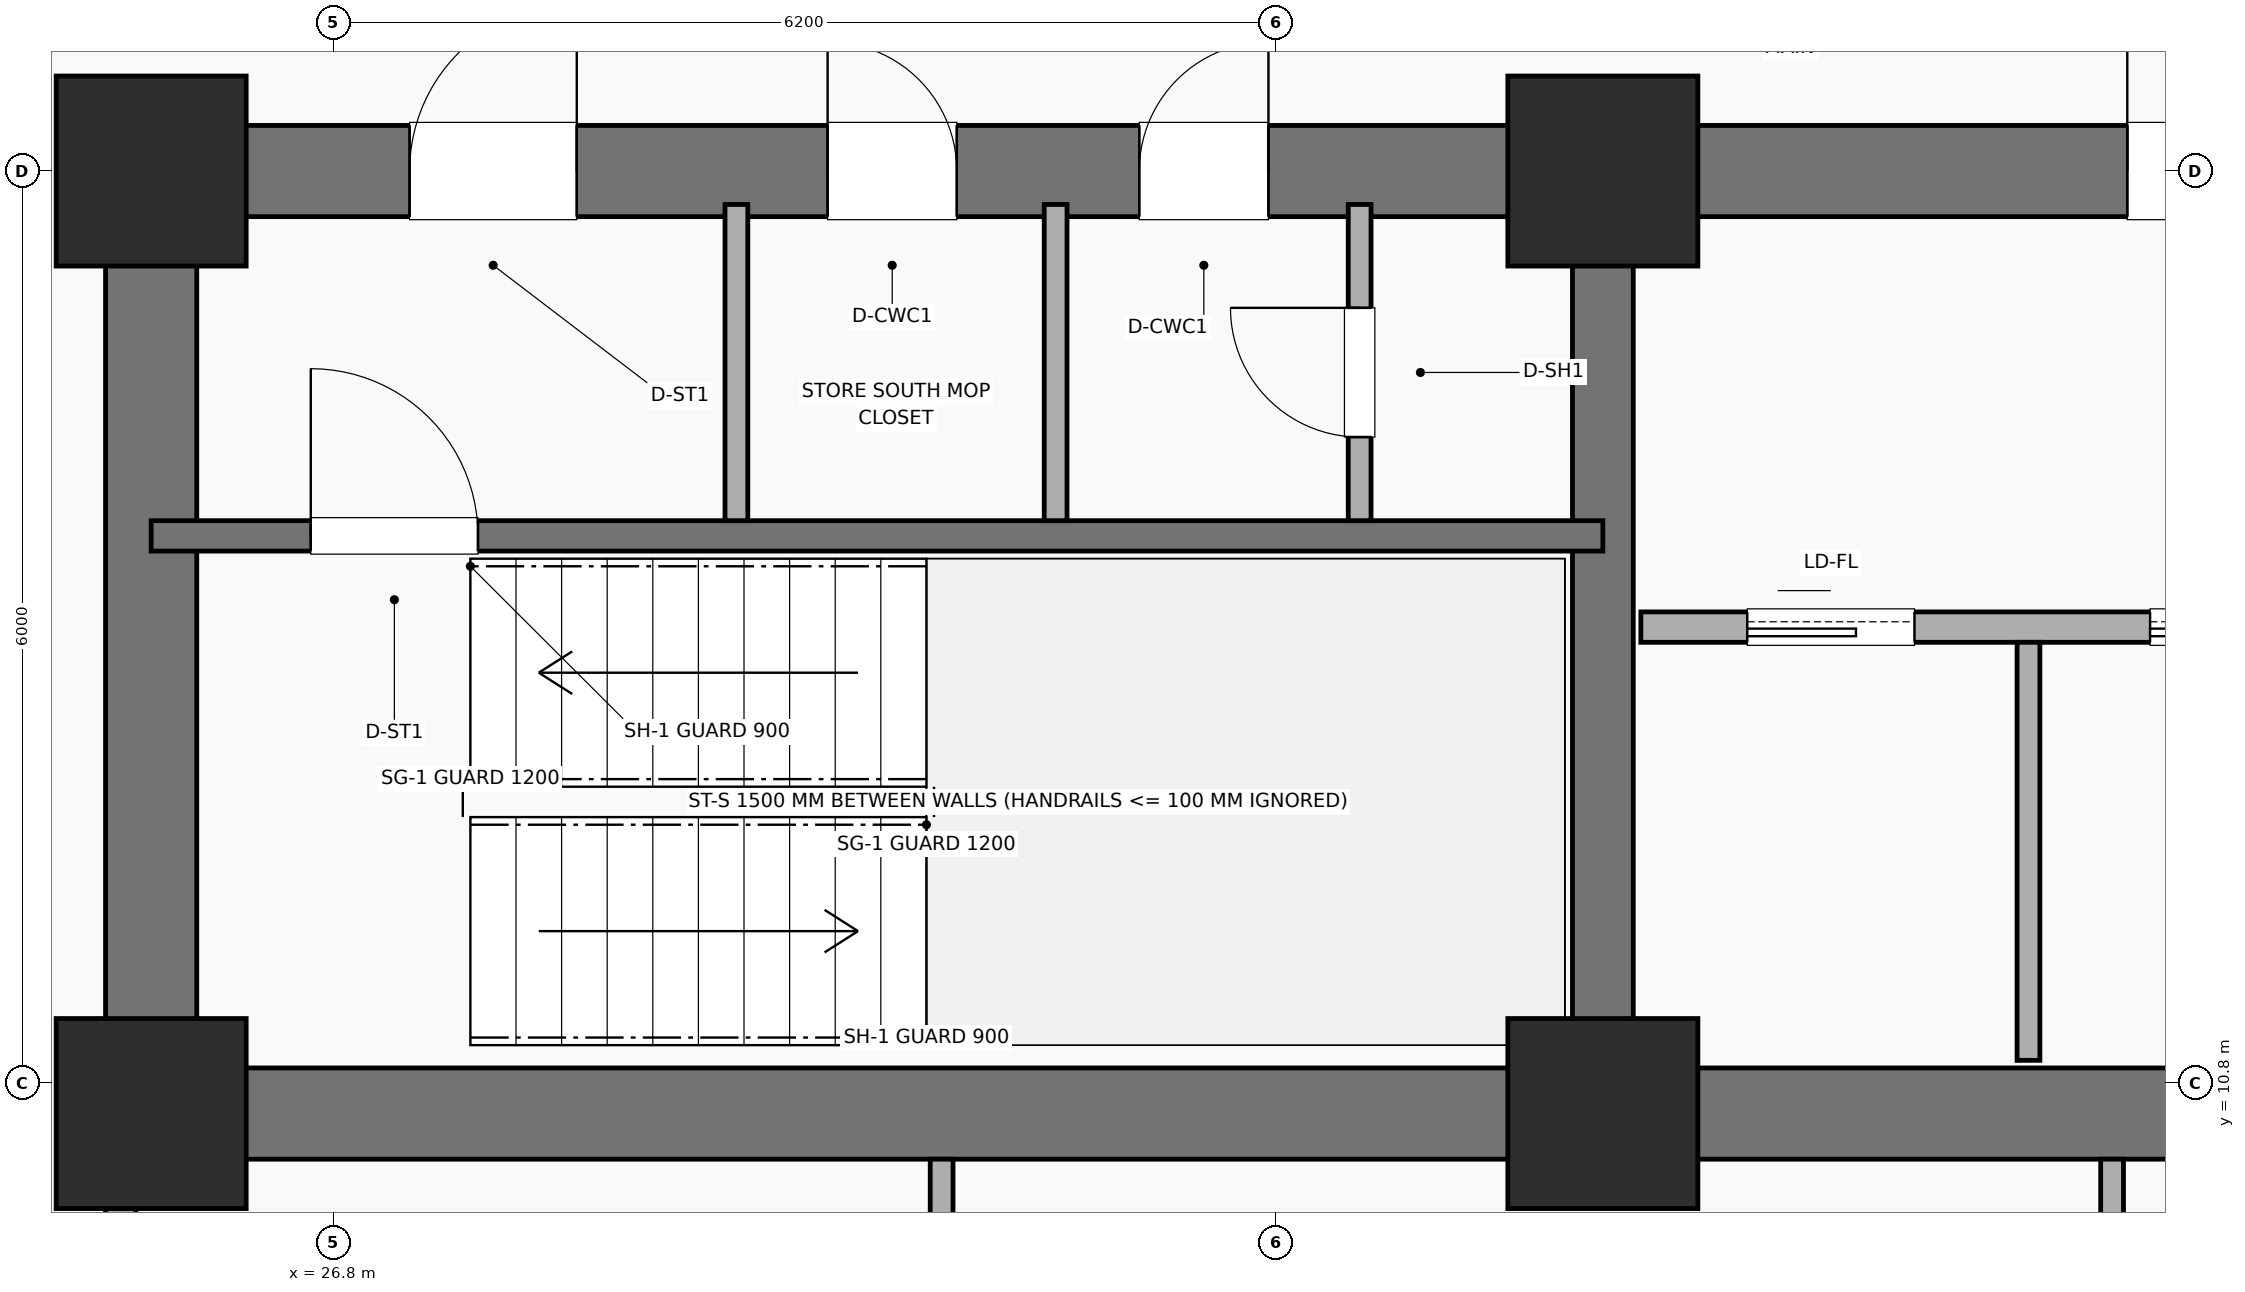
"""IFC4 building model, lengths in metres.
Left out: names, types, materials, properties, quantities, classifications, styles, units other than length and angle.
Written with IfcOpenShell. Run it as: python <this file> out.ifc"""

import sys

from ifc_helpers import new_model, si_unit, direction, frame, frame_2d, origin, origin_2d, place, context, subcontext, project, spatial, rectangle, extrude, element, fill, save


model = new_model("IFC4")
c1 = context("Model", 3, precision=1e-05, world=origin(), true_north=direction((0.0, 1.0)))
c2 = subcontext(c1, "Body", "Model", "MODEL_VIEW")
j1 = project(units=[si_unit("LENGTHUNIT", "METRE"), si_unit("PLANEANGLEUNIT", "RADIAN")], contexts=[c1])
p1 = place(None, origin())
s1 = spatial("IfcSite", under=j1, at=p1, CompositionType="ELEMENT")
p2 = place(p1, origin())
s2 = spatial("IfcBuilding", under=s1, at=p2, CompositionType="ELEMENT")
p3 = place(p2, frame((0.0, 0.0, 36.2)))
s3 = spatial("IfcBuildingStorey", under=s2, at=p3, CompositionType="ELEMENT", Elevation=36.2)
p4 = place(p3, frame((52.8, 10.6, 0.0), z_axis=(0.0, 0.0, 1.0), x_axis=(-1.0, 0.0, 0.0)))
e1 = element("IfcWall", 1, at=p4, inside=s3, PredefinedType="SHEAR", context=c2, shape_type="SweptSolid", body=[
    extrude(rectangle(XDim=27.2, YDim=0.6, at=frame_2d((13.6, 0.0))), origin(), (0.0, 0.0, 1.0), 3.7),
])
p5 = place(p3, frame((25.6, 10.9, 0.0), z_axis=(0.0, 0.0, 1.0), x_axis=(0.0, 1.0, 0.0)))
e2 = element("IfcWall", 2, at=p5, inside=s3, PredefinedType="SHEAR", context=c2, shape_type="SweptSolid", body=[
    extrude(rectangle(XDim=5.6, YDim=0.6, at=frame_2d((2.8, 0.0))), origin(), (0.0, 0.0, 1.0), 3.7),
])
p6 = place(p3, frame((25.6, 16.8, 0.0), z_axis=(0.0, 0.0, 1.0), x_axis=(1.0, 0.0, 0.0)))
e3 = element("IfcWall", 3, at=p6, inside=s3, PredefinedType="SHEAR", context=c2, shape_type="SweptSolid", body=[
    extrude(rectangle(XDim=27.2, YDim=0.6, at=frame_2d((13.6, 0.0))), origin(), (0.0, 0.0, 1.0), 3.7),
])
p7 = place(p6, frame((1.7, 0.0, 0.0)))
e4 = element("IfcOpeningElement", 4, at=p7, cuts=e3, PredefinedType="OPENING", context=c2, shape_type="SweptSolid", body=[
    extrude(rectangle(XDim=1.1, YDim=2.15, at=frame_2d((0.55, 1.075))), frame((0.0, 0.31, 0.0), z_axis=(0.0, -1.0, 0.0), x_axis=(1.0, 0.0, 0.0)), (0.0, 0.0, 1.0), 0.62),
])
p8 = place(p6, frame((4.45, 0.0, 0.0)))
e5 = element("IfcOpeningElement", 5, at=p8, cuts=e3, PredefinedType="OPENING", context=c2, shape_type="SweptSolid", body=[
    extrude(rectangle(XDim=0.85, YDim=2.1, at=frame_2d((0.425, 1.05))), frame((0.0, 0.31, 0.0), z_axis=(0.0, -1.0, 0.0), x_axis=(1.0, 0.0, 0.0)), (0.0, 0.0, 1.0), 0.62),
])
p9 = place(p6, frame((6.5, 0.0, 0.0)))
e6 = element("IfcOpeningElement", 6, at=p9, cuts=e3, PredefinedType="OPENING", context=c2, shape_type="SweptSolid", body=[
    extrude(rectangle(XDim=0.85, YDim=2.1, at=frame_2d((0.425, 1.05))), frame((0.0, 0.31, 0.0), z_axis=(0.0, -1.0, 0.0), x_axis=(1.0, 0.0, 0.0)), (0.0, 0.0, 1.0), 0.62),
])
p10 = place(p6, frame((13.0, 0.0, 0.0)))
e7 = element("IfcOpeningElement", 7, at=p10, cuts=e3, PredefinedType="OPENING", context=c2, shape_type="SweptSolid", body=[
    extrude(rectangle(XDim=1.2, YDim=2.15, at=frame_2d((0.6, 1.075))), frame((0.0, 0.31, 0.0), z_axis=(0.0, -1.0, 0.0), x_axis=(1.0, 0.0, 0.0)), (0.0, 0.0, 1.0), 0.62),
])
p11 = place(p6, frame((20.4, 0.0, 0.0)))
e8 = element("IfcOpeningElement", 8, at=p11, cuts=e3, PredefinedType="OPENING", context=c2, shape_type="SweptSolid", body=[
    extrude(rectangle(XDim=1.3, YDim=2.2, at=frame_2d((0.65, 1.1))), frame((0.0, 0.31, 0.0), z_axis=(0.0, -1.0, 0.0), x_axis=(1.0, 0.0, 0.0)), (0.0, 0.0, 1.0), 0.62),
])
p12 = place(p6, frame((24.65, 0.0, 0.0)))
e9 = element("IfcOpeningElement", 9, at=p12, cuts=e3, PredefinedType="OPENING", context=c2, shape_type="SweptSolid", body=[
    extrude(rectangle(XDim=0.85, YDim=2.1, at=frame_2d((0.425, 1.05))), frame((0.0, 0.31, 0.0), z_axis=(0.0, -1.0, 0.0), x_axis=(1.0, 0.0, 0.0)), (0.0, 0.0, 1.0), 0.62),
])
p13 = place(p3, frame((35.15, 10.9, 0.0), z_axis=(0.0, 0.0, 1.0), x_axis=(0.0, 1.0, 0.0)))
e10 = element("IfcWall", 10, at=p13, inside=s3, PredefinedType="SHEAR", context=c2, shape_type="SweptSolid", body=[
    extrude(rectangle(XDim=5.6, YDim=0.4, at=frame_2d((2.8, 0.0))), origin(), (0.0, 0.0, 1.0), 3.7),
])
for number, where, z_axis, x_axis in (
    (11, (25.6, 10.6, 0.0), (0.0, 0.0, 1.0), (1.0, 0.0, 0.0)),
    (12, (25.6, 16.8, 0.0), (0.0, 0.0, 1.0), (1.0, 0.0, 0.0)),
    (13, (35.15, 10.6, 0.0), (0.0, 0.0, 1.0), (1.0, 0.0, 0.0)),
    (14, (35.15, 16.8, 0.0), (0.0, 0.0, 1.0), (1.0, 0.0, 0.0)),
):
    element("IfcColumn", number, at=place(p3, frame(where, z_axis=z_axis, x_axis=x_axis)), inside=s3, PredefinedType="COLUMN", context=c2, shape_type="SweptSolid", body=[
        extrude(rectangle(XDim=1.25, YDim=1.25, at=origin_2d()), origin(), (0.0, 0.0, 1.0), 3.7),
    ])
p14 = place(p3, frame((25.6, 14.4, 0.0), z_axis=(0.0, 0.0, 1.0), x_axis=(1.0, 0.0, 0.0)))
e15 = element("IfcWall", 15, at=p14, inside=s3, PredefinedType="SHEAR", context=c2, shape_type="SweptSolid", body=[
    extrude(rectangle(XDim=9.55, YDim=0.2, at=frame_2d((4.775, 0.0))), origin(), (0.0, 0.0, 1.0), 3.7),
])
p15 = place(p14, frame((1.05, 0.0, 0.0)))
e16 = element("IfcOpeningElement", 16, at=p15, cuts=e15, PredefinedType="OPENING", context=c2, shape_type="SweptSolid", body=[
    extrude(rectangle(XDim=1.1, YDim=2.15, at=frame_2d((0.55, 1.075))), frame((0.0, 0.11, 0.0), z_axis=(0.0, -1.0, 0.0), x_axis=(1.0, 0.0, 0.0)), (0.0, 0.0, 1.0), 0.22),
])
for number, where, z_axis, x_axis in (
    (17, (29.45, 14.5, 0.0), (0.0, 0.0, 1.0), (0.0, 1.0, 0.0)),
    (18, (31.55, 14.5, 0.0), (0.0, 0.0, 1.0), (0.0, 1.0, 0.0)),
):
    element("IfcWall", number, at=place(p3, frame(where, z_axis=z_axis, x_axis=x_axis)), inside=s3, PredefinedType="PARTITIONING", context=c2, shape_type="SweptSolid", body=[
        extrude(rectangle(XDim=2.08, YDim=0.15, at=frame_2d((1.04, 0.0))), origin(), (0.0, 0.0, 1.0), 2.53),
    ])
p16 = place(p3, frame((33.55, 14.5, 0.0), z_axis=(0.0, 0.0, 1.0), x_axis=(0.0, 1.0, 0.0)))
e19 = element("IfcWall", 19, at=p16, inside=s3, PredefinedType="PARTITIONING", context=c2, shape_type="SweptSolid", body=[
    extrude(rectangle(XDim=2.08, YDim=0.15, at=frame_2d((1.04, 0.0))), origin(), (0.0, 0.0, 1.0), 2.53),
])
p17 = place(p16, frame((0.55, 0.0, 0.0)))
e20 = element("IfcOpeningElement", 20, at=p17, cuts=e19, PredefinedType="OPENING", context=c2, shape_type="SweptSolid", body=[
    extrude(rectangle(XDim=0.85, YDim=2.05, at=frame_2d((0.425, 1.025))), frame((0.0, 0.085, 0.0), z_axis=(0.0, -1.0, 0.0), x_axis=(1.0, 0.0, 0.0)), (0.0, 0.0, 1.0), 0.17),
])
p18 = place(p3, frame((35.4, 13.8, 0.0), z_axis=(0.0, 0.0, 1.0), x_axis=(1.0, 0.0, 0.0)))
e21 = element("IfcWall", 21, at=p18, inside=s3, PredefinedType="PARTITIONING", context=c2, shape_type="SweptSolid", body=[
    extrude(rectangle(XDim=7.6, YDim=0.2, at=frame_2d((3.8, 0.0))), origin(), (0.0, 0.0, 1.0), 2.3),
])
p19 = place(p18, frame((0.7, 0.0, 0.0)))
e22 = element("IfcOpeningElement", 22, at=p19, cuts=e21, PredefinedType="OPENING", context=c2, shape_type="SweptSolid", body=[
    extrude(rectangle(XDim=1.1, YDim=2.15, at=frame_2d((0.55, 1.075))), frame((0.0, 0.11, 0.0), z_axis=(0.0, -1.0, 0.0), x_axis=(1.0, 0.0, 0.0)), (0.0, 0.0, 1.0), 0.22),
])
p20 = place(p18, frame((3.35, 0.0, 0.0)))
e23 = element("IfcOpeningElement", 23, at=p20, cuts=e21, PredefinedType="OPENING", context=c2, shape_type="SweptSolid", body=[
    extrude(rectangle(XDim=1.2, YDim=2.15, at=frame_2d((0.6, 1.075))), frame((0.0, 0.11, 0.0), z_axis=(0.0, -1.0, 0.0), x_axis=(1.0, 0.0, 0.0)), (0.0, 0.0, 1.0), 0.22),
])
p21 = place(p3, frame((37.95, 10.95, 0.0), z_axis=(0.0, 0.0, 1.0), x_axis=(0.0, 1.0, 0.0)))
e24 = element("IfcWall", 24, at=p21, inside=s3, PredefinedType="PARTITIONING", context=c2, shape_type="SweptSolid", body=[
    extrude(rectangle(XDim=2.75, YDim=0.15, at=frame_2d((1.375, 0.0))), origin(), (0.0, 0.0, 1.0), 2.53),
])
p22 = place(p3, frame((30.8, 4.97, 0.0), z_axis=(0.0, 0.0, 1.0), x_axis=(0.0, 1.0, 0.0)))
e25 = element("IfcWall", 25, at=p22, inside=s3, PredefinedType="PARTITIONING", context=c2, shape_type="SweptSolid", body=[
    extrude(rectangle(XDim=5.33, YDim=0.15, at=frame_2d((2.665, 0.0))), origin(), (0.0, 0.0, 1.0), 2.53),
])
p23 = place(p22, frame((1.6, 0.0, 0.0)))
e26 = element("IfcOpeningElement", 26, at=p23, cuts=e25, PredefinedType="OPENING", context=c2, shape_type="SweptSolid", body=[
    extrude(rectangle(XDim=0.9, YDim=2.1, at=frame_2d((0.45, 1.05))), frame((0.0, 0.085, 0.0), z_axis=(0.0, -1.0, 0.0), x_axis=(1.0, 0.0, 0.0)), (0.0, 0.0, 1.0), 0.17),
])
p24 = place(p3, frame((38.5, 4.97, 0.0), z_axis=(0.0, 0.0, 1.0), x_axis=(0.0, 1.0, 0.0)))
e27 = element("IfcWall", 27, at=p24, inside=s3, PredefinedType="PARTITIONING", context=c2, shape_type="SweptSolid", body=[
    extrude(rectangle(XDim=5.33, YDim=0.15, at=frame_2d((2.665, 0.0))), origin(), (0.0, 0.0, 1.0), 2.53),
])
p25 = place(p3, frame((25.4, 5.92, 0.0), z_axis=(0.0, 0.0, 1.0), x_axis=(0.0, 1.0, 0.0)))
e28 = element("IfcWall", 28, at=p25, inside=s3, PredefinedType="PARTITIONING", context=c2, shape_type="SweptSolid", body=[
    extrude(rectangle(XDim=4.38, YDim=0.2, at=frame_2d((2.19, 0.0))), origin(), (0.0, 0.0, 1.0), 2.53),
])
p26 = place(p25, frame((0.85, 0.0, 0.0)))
e29 = element("IfcOpeningElement", 29, at=p26, cuts=e28, PredefinedType="OPENING", context=c2, shape_type="SweptSolid", body=[
    extrude(rectangle(XDim=0.9, YDim=2.1, at=frame_2d((0.45, 1.05))), frame((0.0, 0.11, 0.0), z_axis=(0.0, -1.0, 0.0), x_axis=(1.0, 0.0, 0.0)), (0.0, 0.0, 1.0), 0.22),
])
p27 = place(p15, origin())
e30 = element("IfcDoor", 30, at=p27, inside=s3, OperationType="SINGLE_SWING_LEFT", PredefinedType="DOOR", context=c2, shape_type="SweptSolid", body=[
    extrude(rectangle(XDim=1.1, YDim=2.15, at=frame_2d((0.55, 1.075))), frame((0.0, 0.025, 0.0), z_axis=(0.0, -1.0, 0.0), x_axis=(1.0, 0.0, 0.0)), (0.0, 0.0, 1.0), 0.05),
])
fill(e16, e30)
p28 = place(p17, origin())
e31 = element("IfcDoor", 31, at=p28, inside=s3, OperationType="SINGLE_SWING_RIGHT", PredefinedType="TRAPDOOR", context=c2, shape_type="SweptSolid", body=[
    extrude(rectangle(XDim=0.85, YDim=2.05, at=frame_2d((0.425, 1.025))), frame((0.0, 0.025, 0.0), z_axis=(0.0, -1.0, 0.0), x_axis=(1.0, 0.0, 0.0)), (0.0, 0.0, 1.0), 0.05),
])
fill(e20, e31)
p29 = place(p19, origin())
e32 = element("IfcDoor", 32, at=p29, inside=s3, OperationType="SLIDING_TO_LEFT", PredefinedType="DOOR", context=c2, shape_type="SweptSolid", body=[
    extrude(rectangle(XDim=1.1, YDim=2.15, at=frame_2d((0.55, 1.075))), frame((0.0, 0.025, 0.0), z_axis=(0.0, -1.0, 0.0), x_axis=(1.0, 0.0, 0.0)), (0.0, 0.0, 1.0), 0.05),
])
fill(e22, e32)
p30 = place(p20, origin())
e33 = element("IfcDoor", 33, at=p30, inside=s3, OperationType="SLIDING_TO_LEFT", PredefinedType="DOOR", context=c2, shape_type="SweptSolid", body=[
    extrude(rectangle(XDim=1.2, YDim=2.15, at=frame_2d((0.6, 1.075))), frame((0.0, 0.025, 0.0), z_axis=(0.0, -1.0, 0.0), x_axis=(1.0, 0.0, 0.0)), (0.0, 0.0, 1.0), 0.05),
])
fill(e23, e33)
p31 = place(p7, origin())
e34 = element("IfcDoor", 34, at=p31, inside=s3, OperationType="SINGLE_SWING_RIGHT", PredefinedType="DOOR", context=c2, shape_type="SweptSolid", body=[
    extrude(rectangle(XDim=1.1, YDim=2.15, at=frame_2d((0.55, 1.075))), frame((0.0, 0.025, 0.0), z_axis=(0.0, -1.0, 0.0), x_axis=(1.0, 0.0, 0.0)), (0.0, 0.0, 1.0), 0.05),
])
fill(e4, e34)
p32 = place(p8, origin())
e35 = element("IfcDoor", 35, at=p32, inside=s3, OperationType="SINGLE_SWING_LEFT", PredefinedType="DOOR", context=c2, shape_type="SweptSolid", body=[
    extrude(rectangle(XDim=0.85, YDim=2.1, at=frame_2d((0.425, 1.05))), frame((0.0, 0.025, 0.0), z_axis=(0.0, -1.0, 0.0), x_axis=(1.0, 0.0, 0.0)), (0.0, 0.0, 1.0), 0.05),
])
fill(e5, e35)
p33 = place(p9, origin())
e36 = element("IfcDoor", 36, at=p33, inside=s3, OperationType="SINGLE_SWING_RIGHT", PredefinedType="DOOR", context=c2, shape_type="SweptSolid", body=[
    extrude(rectangle(XDim=0.85, YDim=2.1, at=frame_2d((0.425, 1.05))), frame((0.0, 0.025, 0.0), z_axis=(0.0, -1.0, 0.0), x_axis=(1.0, 0.0, 0.0)), (0.0, 0.0, 1.0), 0.05),
])
fill(e6, e36)
p34 = place(p10, origin())
e37 = element("IfcDoor", 37, at=p34, inside=s3, OperationType="SINGLE_SWING_LEFT", PredefinedType="DOOR", context=c2, shape_type="SweptSolid", body=[
    extrude(rectangle(XDim=1.2, YDim=2.15, at=frame_2d((0.6, 1.075))), frame((0.0, 0.025, 0.0), z_axis=(0.0, -1.0, 0.0), x_axis=(1.0, 0.0, 0.0)), (0.0, 0.0, 1.0), 0.05),
])
fill(e7, e37)
save(model, sys.argv[1])
